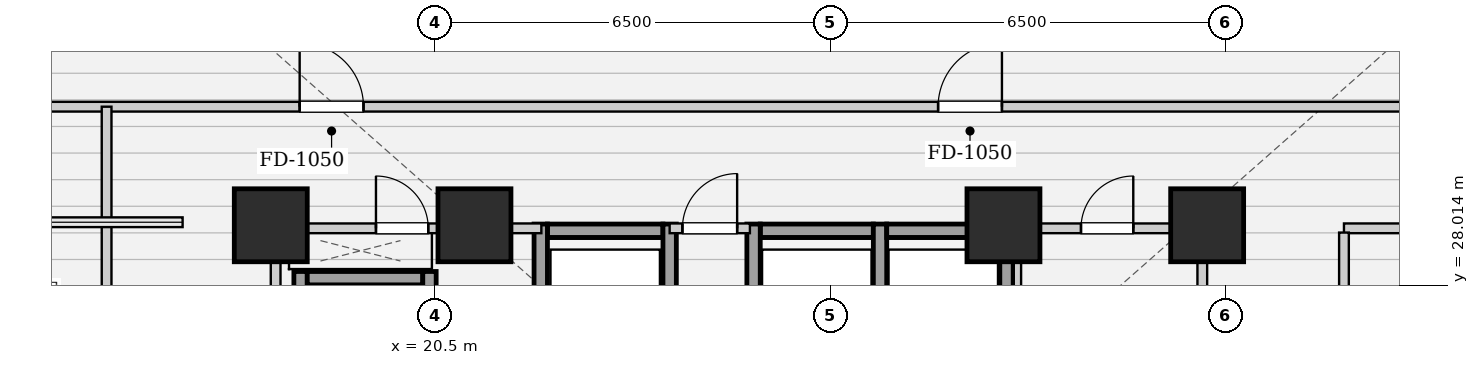
"""IFC4 building model, lengths in metres.
Left out: names, types, materials, properties, quantities, classifications, styles, units other than length and angle.
Written with IfcOpenShell. Run it as: python <this file> out.ifc"""

import sys

from ifc_helpers import new_model, si_unit, direction, frame, frame_2d, origin, origin_2d, place, context, subcontext, project, spatial, rectangle, extrude, element, fill, save


model = new_model("IFC4")
c1 = context("Model", 3, precision=1e-05, world=origin(), true_north=direction((0.0, 1.0)))
c2 = subcontext(c1, "Body", "Model", "MODEL_VIEW")
j1 = project(units=[si_unit("LENGTHUNIT", "METRE"), si_unit("PLANEANGLEUNIT", "RADIAN")], contexts=[c1])
p1 = place(None, origin())
s1 = spatial("IfcSite", under=j1, at=p1, CompositionType="ELEMENT")
p2 = place(p1, origin())
s2 = spatial("IfcBuilding", under=s1, at=p2, CompositionType="ELEMENT")
p3 = place(p2, origin())
s3 = spatial("IfcBuildingStorey", under=s2, at=p3, CompositionType="ELEMENT", Elevation=0.0)
for number, where, z_axis, x_axis in (
    (1, (17.8, 29.0, 0.0), (0.0, 0.0, 1.0), (1.0, 0.0, 0.0)),
    (2, (21.15, 29.0, 0.0), (0.0, 0.0, 1.0), (1.0, 0.0, 0.0)),
    (3, (29.85, 29.0, 0.0), (0.0, 0.0, 1.0), (1.0, 0.0, 0.0)),
    (4, (33.2, 29.0, 0.0), (0.0, 0.0, 1.0), (1.0, 0.0, 0.0)),
):
    element("IfcColumn", number, at=place(p3, frame(where, z_axis=z_axis, x_axis=x_axis)), inside=s3, PredefinedType="COLUMN", context=c2, shape_type="SweptSolid", body=[
        extrude(rectangle(XDim=1.2, YDim=1.2, at=origin_2d()), origin(), (0.0, 0.0, 1.0), 6.0),
    ])
p4 = place(p3, frame((22.35, 28.91, 0.0), z_axis=(0.0, 0.0, 1.0), x_axis=(1.0, 0.0, 0.0)))
e5 = element("IfcWall", 5, at=p4, inside=s3, PredefinedType="SHEAR", context=c2, shape_type="SweptSolid", body=[
    extrude(rectangle(XDim=1.9, YDim=0.22, at=frame_2d((0.95, 0.0))), origin(), (0.0, 0.0, 1.0), 5.68),
])
for number, where, z_axis, x_axis in (
    (6, (22.24, 26.58, 0.0), (0.0, 0.0, 1.0), (0.0, 1.0, 0.0)),
    (7, (24.36, 26.58, 0.0), (0.0, 0.0, 1.0), (0.0, 1.0, 0.0)),
):
    element("IfcWall", number, at=place(p3, frame(where, z_axis=z_axis, x_axis=x_axis)), inside=s3, PredefinedType="SHEAR", context=c2, shape_type="SweptSolid", body=[
        extrude(rectangle(XDim=2.44, YDim=0.22, at=frame_2d((1.22, 0.0))), origin(), (0.0, 0.0, 1.0), 5.68),
    ])
p5 = place(p3, frame((25.85, 28.91, 0.0), z_axis=(0.0, 0.0, 1.0), x_axis=(1.0, 0.0, 0.0)))
e8 = element("IfcWall", 8, at=p5, inside=s3, PredefinedType="SHEAR", context=c2, shape_type="SweptSolid", body=[
    extrude(rectangle(XDim=1.86, YDim=0.22, at=frame_2d((0.93, 0.0))), origin(), (0.0, 0.0, 1.0), 5.68),
])
for number, where, z_axis, x_axis in (
    (9, (25.74, 26.58, 0.0), (0.0, 0.0, 1.0), (0.0, 1.0, 0.0)),
    (10, (27.82, 26.58, 0.0), (0.0, 0.0, 1.0), (0.0, 1.0, 0.0)),
):
    element("IfcWall", number, at=place(p3, frame(where, z_axis=z_axis, x_axis=x_axis)), inside=s3, PredefinedType="SHEAR", context=c2, shape_type="SweptSolid", body=[
        extrude(rectangle(XDim=2.44, YDim=0.22, at=frame_2d((1.22, 0.0))), origin(), (0.0, 0.0, 1.0), 5.68),
    ])
p6 = place(p3, frame((27.93, 28.91, 0.0), z_axis=(0.0, 0.0, 1.0), x_axis=(1.0, 0.0, 0.0)))
e11 = element("IfcWall", 11, at=p6, inside=s3, PredefinedType="SHEAR", context=c2, shape_type="SweptSolid", body=[
    extrude(rectangle(XDim=1.86, YDim=0.22, at=frame_2d((0.93, 0.0))), origin(), (0.0, 0.0, 1.0), 5.68),
])
p7 = place(p3, frame((29.9, 26.58, 0.0), z_axis=(0.0, 0.0, 1.0), x_axis=(0.0, 1.0, 0.0)))
e12 = element("IfcWall", 12, at=p7, inside=s3, PredefinedType="SHEAR", context=c2, shape_type="SweptSolid", body=[
    extrude(rectangle(XDim=2.44, YDim=0.22, at=frame_2d((1.22, 0.0))), origin(), (0.0, 0.0, 1.0), 5.68),
])
p8 = place(p3, frame((18.29, 24.1, 0.0), z_axis=(0.0, 0.0, 1.0), x_axis=(0.0, 1.0, 0.0)))
e13 = element("IfcWall", 13, at=p8, inside=s3, PredefinedType="SHEAR", context=c2, shape_type="SweptSolid", body=[
    extrude(rectangle(XDim=4.14, YDim=0.22, at=frame_2d((2.07, 0.0))), origin(), (0.0, 0.0, 1.0), 5.68),
])
p9 = place(p3, frame((18.4, 28.13, 0.0), z_axis=(0.0, 0.0, 1.0), x_axis=(1.0, 0.0, 0.0)))
e14 = element("IfcWall", 14, at=p9, inside=s3, PredefinedType="SHEAR", context=c2, shape_type="SweptSolid", body=[
    extrude(rectangle(XDim=1.9, YDim=0.22, at=frame_2d((0.95, 0.0))), origin(), (0.0, 0.0, 1.0), 5.68),
])
p10 = place(p3, frame((20.41, 26.06, 0.0), z_axis=(0.0, 0.0, 1.0), x_axis=(0.0, 1.0, 0.0)))
e15 = element("IfcWall", 15, at=p10, inside=s3, PredefinedType="SHEAR", context=c2, shape_type="SweptSolid", body=[
    extrude(rectangle(XDim=2.18, YDim=0.22, at=frame_2d((1.09, 0.0))), origin(), (0.0, 0.0, 1.0), 5.68),
])
p11 = place(p10, frame((0.54, 0.0, 0.0)))
e16 = element("IfcOpeningElement", 16, at=p11, cuts=e15, PredefinedType="OPENING", context=c2, shape_type="SweptSolid", body=[
    extrude(rectangle(XDim=1.1, YDim=2.15, at=frame_2d((0.55, 1.075))), frame((0.0, 0.12, 0.0), z_axis=(0.0, -1.0, 0.0), x_axis=(1.0, 0.0, 0.0)), (0.0, 0.0, 1.0), 0.24),
])
for number, where, z_axis, x_axis in (
    (17, (17.88, 24.12, 0.0), (0.0, 0.0, 1.0), (0.0, 1.0, 0.0)),
    (18, (33.12, 24.12, 0.0), (0.0, 0.0, 1.0), (0.0, 1.0, 0.0)),
):
    element("IfcWall", number, at=place(p3, frame(where, z_axis=z_axis, x_axis=x_axis)), inside=s3, PredefinedType="PARTITIONING", context=c2, shape_type="SweptSolid", body=[
        extrude(rectangle(XDim=4.76, YDim=0.16, at=frame_2d((2.38, 0.0))), origin(), (0.0, 0.0, 1.0), 5.68),
    ])
p12 = place(p3, frame((24.36, 28.95, 0.0), z_axis=(0.0, 0.0, 1.0), x_axis=(1.0, 0.0, 0.0)))
e19 = element("IfcWall", 19, at=p12, inside=s3, PredefinedType="PARTITIONING", context=c2, shape_type="SweptSolid", body=[
    extrude(rectangle(XDim=1.32, YDim=0.16, at=frame_2d((0.66, 0.0))), origin(), (0.0, 0.0, 1.0), 5.68),
])
p13 = place(p12, frame((0.21, 0.0, 0.0)))
e20 = element("IfcOpeningElement", 20, at=p13, cuts=e19, PredefinedType="OPENING", context=c2, shape_type="SweptSolid", body=[
    extrude(rectangle(XDim=0.9, YDim=2.05, at=frame_2d((0.45, 1.025))), frame((0.0, 0.09, 0.0), z_axis=(0.0, -1.0, 0.0), x_axis=(1.0, 0.0, 0.0)), (0.0, 0.0, 1.0), 0.18),
])
p14 = place(p3, frame((17.96, 28.95, 0.0), z_axis=(0.0, 0.0, 1.0), x_axis=(1.0, 0.0, 0.0)))
e21 = element("IfcWall", 21, at=p14, inside=s3, PredefinedType="PARTITIONING", context=c2, shape_type="SweptSolid", body=[
    extrude(rectangle(XDim=4.29, YDim=0.16, at=frame_2d((2.145, 0.0))), origin(), (0.0, 0.0, 1.0), 5.68),
])
p15 = place(p14, frame((1.57, 0.0, 0.0)))
e22 = element("IfcOpeningElement", 22, at=p15, cuts=e21, PredefinedType="OPENING", context=c2, shape_type="SweptSolid", body=[
    extrude(rectangle(XDim=0.86, YDim=2.05, at=frame_2d((0.43, 1.025))), frame((0.0, 0.09, 0.0), z_axis=(0.0, -1.0, 0.0), x_axis=(1.0, 0.0, 0.0)), (0.0, 0.0, 1.0), 0.18),
])
p16 = place(p3, frame((30.08, 26.18, 0.0), z_axis=(0.0, 0.0, 1.0), x_axis=(0.0, 1.0, 0.0)))
e23 = element("IfcWall", 23, at=p16, inside=s3, PredefinedType="PARTITIONING", context=c2, shape_type="SweptSolid", body=[
    extrude(rectangle(XDim=2.68, YDim=0.12, at=frame_2d((1.34, 0.0))), origin(), (0.0, 0.0, 1.0), 5.68),
])
p17 = place(p3, frame((30.08, 28.95, 0.0), z_axis=(0.0, 0.0, 1.0), x_axis=(1.0, 0.0, 0.0)))
e24 = element("IfcWall", 24, at=p17, inside=s3, PredefinedType="PARTITIONING", context=c2, shape_type="SweptSolid", body=[
    extrude(rectangle(XDim=2.96, YDim=0.16, at=frame_2d((1.48, 0.0))), origin(), (0.0, 0.0, 1.0), 5.68),
])
p18 = place(p17, frame((1.045, 0.0, 0.0)))
e25 = element("IfcOpeningElement", 25, at=p18, cuts=e24, PredefinedType="OPENING", context=c2, shape_type="SweptSolid", body=[
    extrude(rectangle(XDim=0.86, YDim=2.05, at=frame_2d((0.43, 1.025))), frame((0.0, 0.09, 0.0), z_axis=(0.0, -1.0, 0.0), x_axis=(1.0, 0.0, 0.0)), (0.0, 0.0, 1.0), 0.18),
])
p19 = place(p3, frame((0.3, 30.95, 0.0), z_axis=(0.0, 0.0, 1.0), x_axis=(1.0, 0.0, 0.0)))
e26 = element("IfcWall", 26, at=p19, inside=s3, PredefinedType="PARTITIONING", context=c2, shape_type="SweptSolid", body=[
    extrude(rectangle(XDim=47.35, YDim=0.16, at=frame_2d((23.675, 0.0))), origin(), (0.0, 0.0, 1.0), 5.68),
])
p20 = place(p19, frame((17.975, 0.0, 0.0)))
e27 = element("IfcOpeningElement", 27, at=p20, cuts=e26, PredefinedType="OPENING", context=c2, shape_type="SweptSolid", body=[
    extrude(rectangle(XDim=1.05, YDim=2.05, at=frame_2d((0.525, 1.025))), frame((0.0, 0.09, 0.0), z_axis=(0.0, -1.0, 0.0), x_axis=(1.0, 0.0, 0.0)), (0.0, 0.0, 1.0), 0.18),
])
p21 = place(p19, frame((28.475, 0.0, 0.0)))
e28 = element("IfcOpeningElement", 28, at=p21, cuts=e26, PredefinedType="OPENING", context=c2, shape_type="SweptSolid", body=[
    extrude(rectangle(XDim=1.05, YDim=2.05, at=frame_2d((0.525, 1.025))), frame((0.0, 0.09, 0.0), z_axis=(0.0, -1.0, 0.0), x_axis=(1.0, 0.0, 0.0)), (0.0, 0.0, 1.0), 0.18),
])
p22 = place(p19, frame((8.64, 0.0, 0.0)))
e29 = element("IfcOpeningElement", 29, at=p22, cuts=e26, PredefinedType="OPENING", context=c2, shape_type="SweptSolid", body=[
    extrude(rectangle(XDim=0.9, YDim=2.05, at=frame_2d((0.45, 1.025))), frame((0.0, 0.09, 0.0), z_axis=(0.0, -1.0, 0.0), x_axis=(1.0, 0.0, 0.0)), (0.0, 0.0, 1.0), 0.18),
])
p23 = place(p3, frame((35.45, 28.95, 0.0), z_axis=(0.0, 0.0, 1.0), x_axis=(1.0, 0.0, 0.0)))
e30 = element("IfcWall", 30, at=p23, inside=s3, PredefinedType="PARTITIONING", context=c2, shape_type="SweptSolid", body=[
    extrude(rectangle(XDim=12.2, YDim=0.16, at=frame_2d((6.1, 0.0))), origin(), (0.0, 0.0, 1.0), 4.565),
])
p24 = place(p3, frame((15.1, 14.98, 0.0), z_axis=(0.0, 0.0, 1.0), x_axis=(0.0, 1.0, 0.0)))
e31 = element("IfcWall", 31, at=p24, inside=s3, PredefinedType="PARTITIONING", context=c2, shape_type="SweptSolid", body=[
    extrude(rectangle(XDim=15.97, YDim=0.16, at=frame_2d((7.985, 0.0))), origin(), (0.0, 0.0, 1.0), 5.68),
])
p25 = place(p24, frame((4.225, 0.0, 0.0)))
e32 = element("IfcOpeningElement", 32, at=p25, cuts=e31, PredefinedType="OPENING", context=c2, shape_type="SweptSolid", body=[
    extrude(rectangle(XDim=1.05, YDim=2.05, at=frame_2d((0.525, 1.025))), frame((0.0, 0.09, 0.0), z_axis=(0.0, -1.0, 0.0), x_axis=(1.0, 0.0, 0.0)), (0.0, 0.0, 1.0), 0.18),
])
p26 = place(p3, frame((35.45, 15.1, 0.0), z_axis=(0.0, 0.0, 1.0), x_axis=(0.0, 1.0, 0.0)))
e33 = element("IfcWall", 33, at=p26, inside=s3, PredefinedType="PARTITIONING", context=c2, shape_type="SweptSolid", body=[
    extrude(rectangle(XDim=13.78, YDim=0.16, at=frame_2d((6.89, 0.0))), origin(), (0.0, 0.0, 1.0), 5.68),
])
p27 = place(p26, frame((6.975, 0.0, 0.0)))
e34 = element("IfcOpeningElement", 34, at=p27, cuts=e33, PredefinedType="OPENING", context=c2, shape_type="SweptSolid", body=[
    extrude(rectangle(XDim=1.05, YDim=2.05, at=frame_2d((0.525, 1.025))), frame((0.0, 0.09, 0.0), z_axis=(0.0, -1.0, 0.0), x_axis=(1.0, 0.0, 0.0)), (0.0, 0.0, 1.0), 0.18),
])
p28 = place(p13, origin())
e35 = element("IfcDoor", 35, at=p28, inside=s3, OperationType="SINGLE_SWING_RIGHT", PredefinedType="DOOR", context=c2, shape_type="SweptSolid", body=[
    extrude(rectangle(XDim=0.9, YDim=2.05, at=frame_2d((0.45, 1.025))), frame((0.0, 0.025, 0.0), z_axis=(0.0, -1.0, 0.0), x_axis=(1.0, 0.0, 0.0)), (0.0, 0.0, 1.0), 0.05),
])
fill(e20, e35)
p29 = place(p15, origin())
e36 = element("IfcDoor", 36, at=p29, inside=s3, OperationType="SINGLE_SWING_LEFT", PredefinedType="DOOR", context=c2, shape_type="SweptSolid", body=[
    extrude(rectangle(XDim=0.86, YDim=2.05, at=frame_2d((0.43, 1.025))), frame((0.0, 0.025, 0.0), z_axis=(0.0, -1.0, 0.0), x_axis=(1.0, 0.0, 0.0)), (0.0, 0.0, 1.0), 0.05),
])
fill(e22, e36)
p30 = place(p18, origin())
e37 = element("IfcDoor", 37, at=p30, inside=s3, OperationType="SINGLE_SWING_RIGHT", PredefinedType="DOOR", context=c2, shape_type="SweptSolid", body=[
    extrude(rectangle(XDim=0.86, YDim=2.05, at=frame_2d((0.43, 1.025))), frame((0.0, 0.025, 0.0), z_axis=(0.0, -1.0, 0.0), x_axis=(1.0, 0.0, 0.0)), (0.0, 0.0, 1.0), 0.05),
])
fill(e25, e37)
p31 = place(p20, origin())
e38 = element("IfcDoor", 38, at=p31, inside=s3, OperationType="SINGLE_SWING_LEFT", PredefinedType="DOOR", context=c2, shape_type="SweptSolid", body=[
    extrude(rectangle(XDim=1.05, YDim=2.05, at=frame_2d((0.525, 1.025))), frame((0.0, 0.025, 0.0), z_axis=(0.0, -1.0, 0.0), x_axis=(1.0, 0.0, 0.0)), (0.0, 0.0, 1.0), 0.05),
])
fill(e27, e38)
p32 = place(p21, origin())
e39 = element("IfcDoor", 39, at=p32, inside=s3, OperationType="SINGLE_SWING_RIGHT", PredefinedType="DOOR", context=c2, shape_type="SweptSolid", body=[
    extrude(rectangle(XDim=1.05, YDim=2.05, at=frame_2d((0.525, 1.025))), frame((0.0, 0.025, 0.0), z_axis=(0.0, -1.0, 0.0), x_axis=(1.0, 0.0, 0.0)), (0.0, 0.0, 1.0), 0.05),
])
fill(e28, e39)
save(model, sys.argv[1])
